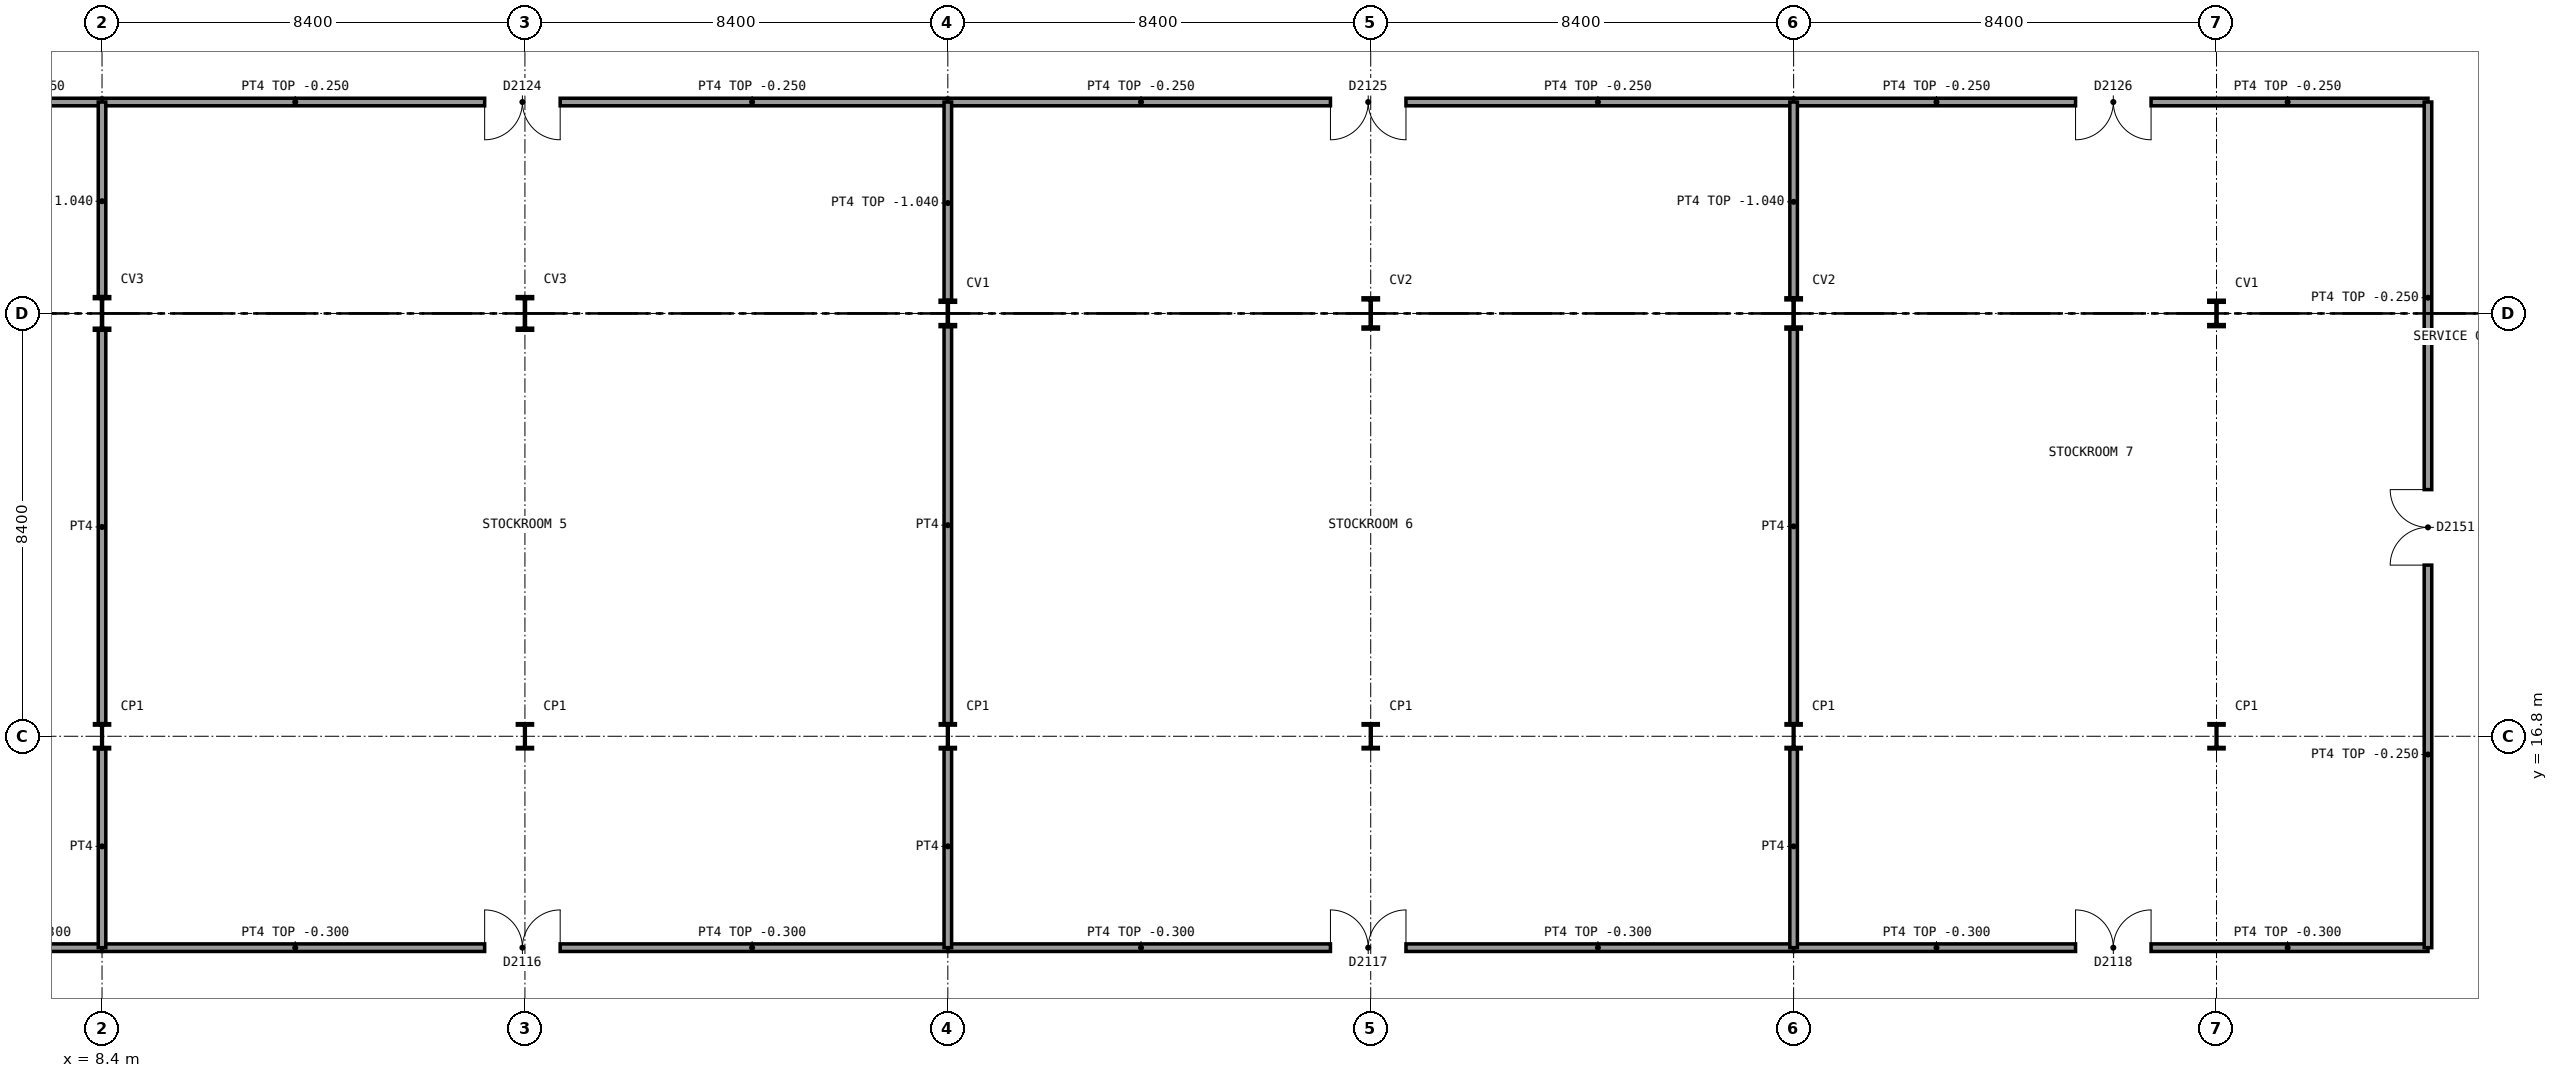
"""IFC4 building model, lengths in metres.
Left out: names, types, materials, properties, quantities, classifications, styles, units other than length and angle.
Written with IfcOpenShell. Run it as: python <this file> out.ifc"""

import sys

from ifc_helpers import new_model, si_unit, direction, frame, frame_2d, origin, origin_2d, place, context, subcontext, project, spatial, rectangle, i_section, extrude, element, fill, save


model = new_model("IFC4")
c1 = context("Model", 3, precision=1e-05, world=origin(), true_north=direction((0.0, 1.0)))
c2 = subcontext(c1, "Body", "Model", "MODEL_VIEW")
j1 = project(units=[si_unit("LENGTHUNIT", "METRE"), si_unit("PLANEANGLEUNIT", "RADIAN")], contexts=[c1])
p1 = place(None, origin())
s1 = spatial("IfcSite", under=j1, at=p1, CompositionType="ELEMENT")
p2 = place(p1, origin())
s2 = spatial("IfcBuilding", under=s1, at=p2, CompositionType="ELEMENT")
p3 = place(p2, frame((0.0, 0.0, -4.9)))
s3 = spatial("IfcBuildingStorey", under=s2, at=p3, CompositionType="ELEMENT", Elevation=-4.9)
p4 = place(p3, frame((8.4, 16.8, 0.0), z_axis=(0.0, 0.0, 1.0), x_axis=(1.0, 0.0, 0.0)))
e1 = element("IfcColumn", 1, at=p4, inside=s3, PredefinedType="COLUMN", context=c2, shape_type="SweptSolid", body=[
    extrude(i_section(OverallWidth=0.3, OverallDepth=0.5, WebThickness=0.014, FlangeThickness=0.028, FilletRadius=0.027, at=origin_2d()), origin(), (0.0, 0.0, 1.0), 4.9),
])
p5 = place(p3, frame((8.4, 25.2, 0.0), z_axis=(0.0, 0.0, 1.0), x_axis=(1.0, 0.0, 0.0)))
e2 = element("IfcColumn", 2, at=p5, inside=s3, PredefinedType="COLUMN", context=c2, shape_type="SweptSolid", body=[
    extrude(i_section(OverallWidth=0.305, OverallDepth=0.668, WebThickness=0.021, FlangeThickness=0.04, FilletRadius=0.027, at=origin_2d()), origin(), (0.0, 0.0, 1.0), 4.9),
])
p6 = place(p3, frame((16.8, 16.8, 0.0), z_axis=(0.0, 0.0, 1.0), x_axis=(1.0, 0.0, 0.0)))
e3 = element("IfcColumn", 3, at=p6, inside=s3, PredefinedType="COLUMN", context=c2, shape_type="SweptSolid", body=[
    extrude(i_section(OverallWidth=0.3, OverallDepth=0.5, WebThickness=0.014, FlangeThickness=0.028, FilletRadius=0.027, at=origin_2d()), origin(), (0.0, 0.0, 1.0), 4.9),
])
p7 = place(p3, frame((16.8, 25.2, 0.0), z_axis=(0.0, 0.0, 1.0), x_axis=(1.0, 0.0, 0.0)))
e4 = element("IfcColumn", 4, at=p7, inside=s3, PredefinedType="COLUMN", context=c2, shape_type="SweptSolid", body=[
    extrude(i_section(OverallWidth=0.305, OverallDepth=0.668, WebThickness=0.021, FlangeThickness=0.04, FilletRadius=0.027, at=origin_2d()), origin(), (0.0, 0.0, 1.0), 4.9),
])
p8 = place(p3, frame((25.2, 16.8, 0.0), z_axis=(0.0, 0.0, 1.0), x_axis=(1.0, 0.0, 0.0)))
e5 = element("IfcColumn", 5, at=p8, inside=s3, PredefinedType="COLUMN", context=c2, shape_type="SweptSolid", body=[
    extrude(i_section(OverallWidth=0.3, OverallDepth=0.5, WebThickness=0.014, FlangeThickness=0.028, FilletRadius=0.027, at=origin_2d()), origin(), (0.0, 0.0, 1.0), 4.9),
])
p9 = place(p3, frame((25.2, 25.2, 0.0), z_axis=(0.0, 0.0, 1.0), x_axis=(1.0, 0.0, 0.0)))
e6 = element("IfcColumn", 6, at=p9, inside=s3, PredefinedType="COLUMN", context=c2, shape_type="SweptSolid", body=[
    extrude(i_section(OverallWidth=0.306, OverallDepth=0.524, WebThickness=0.021, FlangeThickness=0.04, FilletRadius=0.027, at=origin_2d()), origin(), (0.0, 0.0, 1.0), 4.9),
])
p10 = place(p3, frame((33.6, 16.8, 0.0), z_axis=(0.0, 0.0, 1.0), x_axis=(1.0, 0.0, 0.0)))
e7 = element("IfcColumn", 7, at=p10, inside=s3, PredefinedType="COLUMN", context=c2, shape_type="SweptSolid", body=[
    extrude(i_section(OverallWidth=0.3, OverallDepth=0.5, WebThickness=0.014, FlangeThickness=0.028, FilletRadius=0.027, at=origin_2d()), origin(), (0.0, 0.0, 1.0), 4.9),
])
p11 = place(p3, frame((33.6, 25.2, 0.0), z_axis=(0.0, 0.0, 1.0), x_axis=(1.0, 0.0, 0.0)))
e8 = element("IfcColumn", 8, at=p11, inside=s3, PredefinedType="COLUMN", context=c2, shape_type="SweptSolid", body=[
    extrude(i_section(OverallWidth=0.305, OverallDepth=0.62, WebThickness=0.021, FlangeThickness=0.04, FilletRadius=0.027, at=origin_2d()), origin(), (0.0, 0.0, 1.0), 4.9),
])
p12 = place(p3, frame((42.0, 16.8, 0.0), z_axis=(0.0, 0.0, 1.0), x_axis=(1.0, 0.0, 0.0)))
e9 = element("IfcColumn", 9, at=p12, inside=s3, PredefinedType="COLUMN", context=c2, shape_type="SweptSolid", body=[
    extrude(i_section(OverallWidth=0.3, OverallDepth=0.5, WebThickness=0.014, FlangeThickness=0.028, FilletRadius=0.027, at=origin_2d()), origin(), (0.0, 0.0, 1.0), 4.9),
])
p13 = place(p3, frame((42.0, 25.2, 0.0), z_axis=(0.0, 0.0, 1.0), x_axis=(1.0, 0.0, 0.0)))
e10 = element("IfcColumn", 10, at=p13, inside=s3, PredefinedType="COLUMN", context=c2, shape_type="SweptSolid", body=[
    extrude(i_section(OverallWidth=0.305, OverallDepth=0.62, WebThickness=0.021, FlangeThickness=0.04, FilletRadius=0.027, at=origin_2d()), origin(), (0.0, 0.0, 1.0), 4.9),
])
p14 = place(p3, frame((50.4, 16.8, 0.0), z_axis=(0.0, 0.0, 1.0), x_axis=(1.0, 0.0, 0.0)))
e11 = element("IfcColumn", 11, at=p14, inside=s3, PredefinedType="COLUMN", context=c2, shape_type="SweptSolid", body=[
    extrude(i_section(OverallWidth=0.3, OverallDepth=0.5, WebThickness=0.014, FlangeThickness=0.028, FilletRadius=0.027, at=origin_2d()), origin(), (0.0, 0.0, 1.0), 4.9),
])
p15 = place(p3, frame((50.4, 25.2, 0.0), z_axis=(0.0, 0.0, 1.0), x_axis=(1.0, 0.0, 0.0)))
e12 = element("IfcColumn", 12, at=p15, inside=s3, PredefinedType="COLUMN", context=c2, shape_type="SweptSolid", body=[
    extrude(i_section(OverallWidth=0.306, OverallDepth=0.524, WebThickness=0.021, FlangeThickness=0.04, FilletRadius=0.027, at=origin_2d()), origin(), (0.0, 0.0, 1.0), 4.9),
])
p16 = place(p3, frame((0.25, 12.6, 0.0), z_axis=(0.0, 0.0, 1.0), x_axis=(1.0, 0.0, 0.0)))
e13 = element("IfcWall", 13, at=p16, inside=s3, PredefinedType="SOLIDWALL", context=c2, shape_type="SweptSolid", body=[
    extrude(rectangle(XDim=8.15, YDim=0.15, at=frame_2d((4.075, 0.0))), origin(), (0.0, 0.0, 1.0), 4.6),
])
p17 = place(p16, frame((3.35, 0.0, 0.0)))
e14 = element("IfcOpeningElement", 14, at=p17, cuts=e13, PredefinedType="OPENING", context=c2, shape_type="SweptSolid", body=[
    extrude(rectangle(XDim=1.5, YDim=2.1, at=frame_2d((0.75, 1.05))), frame((0.0, 0.085, 0.0), z_axis=(0.0, -1.0, 0.0), x_axis=(1.0, 0.0, 0.0)), (0.0, 0.0, 1.0), 0.17),
])
p18 = place(p3, frame((8.4, 12.6, 0.0), z_axis=(0.0, 0.0, 1.0), x_axis=(1.0, 0.0, 0.0)))
e15 = element("IfcWall", 15, at=p18, inside=s3, PredefinedType="SOLIDWALL", context=c2, shape_type="SweptSolid", body=[
    extrude(rectangle(XDim=16.8, YDim=0.15, at=frame_2d((8.4, 0.0))), origin(), (0.0, 0.0, 1.0), 4.6),
])
p19 = place(p18, frame((7.6, 0.0, 0.0)))
e16 = element("IfcOpeningElement", 16, at=p19, cuts=e15, PredefinedType="OPENING", context=c2, shape_type="SweptSolid", body=[
    extrude(rectangle(XDim=1.5, YDim=2.1, at=frame_2d((0.75, 1.05))), frame((0.0, 0.085, 0.0), z_axis=(0.0, -1.0, 0.0), x_axis=(1.0, 0.0, 0.0)), (0.0, 0.0, 1.0), 0.17),
])
p20 = place(p3, frame((25.2, 12.6, 0.0), z_axis=(0.0, 0.0, 1.0), x_axis=(1.0, 0.0, 0.0)))
e17 = element("IfcWall", 17, at=p20, inside=s3, PredefinedType="SOLIDWALL", context=c2, shape_type="SweptSolid", body=[
    extrude(rectangle(XDim=16.8, YDim=0.15, at=frame_2d((8.4, 0.0))), origin(), (0.0, 0.0, 1.0), 4.6),
])
p21 = place(p20, frame((7.6, 0.0, 0.0)))
e18 = element("IfcOpeningElement", 18, at=p21, cuts=e17, PredefinedType="OPENING", context=c2, shape_type="SweptSolid", body=[
    extrude(rectangle(XDim=1.5, YDim=2.1, at=frame_2d((0.75, 1.05))), frame((0.0, 0.085, 0.0), z_axis=(0.0, -1.0, 0.0), x_axis=(1.0, 0.0, 0.0)), (0.0, 0.0, 1.0), 0.17),
])
p22 = place(p3, frame((42.0, 12.6, 0.0), z_axis=(0.0, 0.0, 1.0), x_axis=(1.0, 0.0, 0.0)))
e19 = element("IfcWall", 19, at=p22, inside=s3, PredefinedType="SOLIDWALL", context=c2, shape_type="SweptSolid", body=[
    extrude(rectangle(XDim=12.6, YDim=0.15, at=frame_2d((6.3, 0.0))), origin(), (0.0, 0.0, 1.0), 4.6),
])
p23 = place(p22, frame((5.6, 0.0, 0.0)))
e20 = element("IfcOpeningElement", 20, at=p23, cuts=e19, PredefinedType="OPENING", context=c2, shape_type="SweptSolid", body=[
    extrude(rectangle(XDim=1.5, YDim=2.1, at=frame_2d((0.75, 1.05))), frame((0.0, 0.085, 0.0), z_axis=(0.0, -1.0, 0.0), x_axis=(1.0, 0.0, 0.0)), (0.0, 0.0, 1.0), 0.17),
])
p24 = place(p3, frame((0.0, 29.4, 0.0), z_axis=(0.0, 0.0, 1.0), x_axis=(1.0, 0.0, 0.0)))
e21 = element("IfcWall", 21, at=p24, inside=s3, PredefinedType="SOLIDWALL", context=c2, shape_type="SweptSolid", body=[
    extrude(rectangle(XDim=8.4, YDim=0.15, at=frame_2d((4.2, 0.0))), origin(), (0.0, 0.0, 1.0), 4.65),
])
p25 = place(p24, frame((3.35, 0.0, 0.0)))
e22 = element("IfcOpeningElement", 22, at=p25, cuts=e21, PredefinedType="OPENING", context=c2, shape_type="SweptSolid", body=[
    extrude(rectangle(XDim=1.5, YDim=2.1, at=frame_2d((0.75, 1.05))), frame((0.0, 0.085, 0.0), z_axis=(0.0, -1.0, 0.0), x_axis=(1.0, 0.0, 0.0)), (0.0, 0.0, 1.0), 0.17),
])
p26 = place(p3, frame((8.4, 29.4, 0.0), z_axis=(0.0, 0.0, 1.0), x_axis=(1.0, 0.0, 0.0)))
e23 = element("IfcWall", 23, at=p26, inside=s3, PredefinedType="SOLIDWALL", context=c2, shape_type="SweptSolid", body=[
    extrude(rectangle(XDim=16.8, YDim=0.15, at=frame_2d((8.4, 0.0))), origin(), (0.0, 0.0, 1.0), 4.65),
])
p27 = place(p26, frame((7.6, 0.0, 0.0)))
e24 = element("IfcOpeningElement", 24, at=p27, cuts=e23, PredefinedType="OPENING", context=c2, shape_type="SweptSolid", body=[
    extrude(rectangle(XDim=1.5, YDim=2.1, at=frame_2d((0.75, 1.05))), frame((0.0, 0.085, 0.0), z_axis=(0.0, -1.0, 0.0), x_axis=(1.0, 0.0, 0.0)), (0.0, 0.0, 1.0), 0.17),
])
p28 = place(p3, frame((25.2, 29.4, 0.0), z_axis=(0.0, 0.0, 1.0), x_axis=(1.0, 0.0, 0.0)))
e25 = element("IfcWall", 25, at=p28, inside=s3, PredefinedType="SOLIDWALL", context=c2, shape_type="SweptSolid", body=[
    extrude(rectangle(XDim=16.8, YDim=0.15, at=frame_2d((8.4, 0.0))), origin(), (0.0, 0.0, 1.0), 4.65),
])
p29 = place(p28, frame((7.6, 0.0, 0.0)))
e26 = element("IfcOpeningElement", 26, at=p29, cuts=e25, PredefinedType="OPENING", context=c2, shape_type="SweptSolid", body=[
    extrude(rectangle(XDim=1.5, YDim=2.1, at=frame_2d((0.75, 1.05))), frame((0.0, 0.085, 0.0), z_axis=(0.0, -1.0, 0.0), x_axis=(1.0, 0.0, 0.0)), (0.0, 0.0, 1.0), 0.17),
])
p30 = place(p3, frame((42.0, 29.4, 0.0), z_axis=(0.0, 0.0, 1.0), x_axis=(1.0, 0.0, 0.0)))
e27 = element("IfcWall", 27, at=p30, inside=s3, PredefinedType="SOLIDWALL", context=c2, shape_type="SweptSolid", body=[
    extrude(rectangle(XDim=12.6, YDim=0.15, at=frame_2d((6.3, 0.0))), origin(), (0.0, 0.0, 1.0), 4.65),
])
p31 = place(p30, frame((5.6, 0.0, 0.0)))
e28 = element("IfcOpeningElement", 28, at=p31, cuts=e27, PredefinedType="OPENING", context=c2, shape_type="SweptSolid", body=[
    extrude(rectangle(XDim=1.5, YDim=2.1, at=frame_2d((0.75, 1.05))), frame((0.0, 0.085, 0.0), z_axis=(0.0, -1.0, 0.0), x_axis=(1.0, 0.0, 0.0)), (0.0, 0.0, 1.0), 0.17),
])
p32 = place(p3, frame((54.6, 12.6, 0.0), z_axis=(0.0, 0.0, 1.0), x_axis=(0.0, 1.0, 0.0)))
e29 = element("IfcWall", 29, at=p32, inside=s3, PredefinedType="SOLIDWALL", context=c2, shape_type="SweptSolid", body=[
    extrude(rectangle(XDim=16.8, YDim=0.15, at=frame_2d((8.4, 0.0))), origin(), (0.0, 0.0, 1.0), 4.65),
])
p33 = place(p32, frame((7.6, 0.0, 0.0)))
e30 = element("IfcOpeningElement", 30, at=p33, cuts=e29, PredefinedType="OPENING", context=c2, shape_type="SweptSolid", body=[
    extrude(rectangle(XDim=1.5, YDim=2.1, at=frame_2d((0.75, 1.05))), frame((0.0, 0.085, 0.0), z_axis=(0.0, -1.0, 0.0), x_axis=(1.0, 0.0, 0.0)), (0.0, 0.0, 1.0), 0.17),
])
p34 = place(p3, frame((8.4, 12.6, 0.0), z_axis=(0.0, 0.0, 1.0), x_axis=(0.0, 1.0, 0.0)))
e31 = element("IfcWall", 31, at=p34, inside=s3, PredefinedType="SOLIDWALL", context=c2, shape_type="SweptSolid", body=[
    extrude(rectangle(XDim=3.95, YDim=0.15, at=frame_2d((1.975, 0.0))), origin(), (0.0, 0.0, 1.0), 4.26),
])
p35 = place(p3, frame((8.4, 17.05, 0.0), z_axis=(0.0, 0.0, 1.0), x_axis=(0.0, 1.0, 0.0)))
e32 = element("IfcWall", 32, at=p35, inside=s3, PredefinedType="SOLIDWALL", context=c2, shape_type="SweptSolid", body=[
    extrude(rectangle(XDim=7.816, YDim=0.15, at=frame_2d((3.908, 0.0))), origin(), (0.0, 0.0, 1.0), 4.26),
])
p36 = place(p3, frame((8.4, 25.534, 0.0), z_axis=(0.0, 0.0, 1.0), x_axis=(0.0, 1.0, 0.0)))
e33 = element("IfcWall", 33, at=p36, inside=s3, PredefinedType="SOLIDWALL", context=c2, shape_type="SweptSolid", body=[
    extrude(rectangle(XDim=3.866, YDim=0.15, at=frame_2d((1.933, 0.0))), origin(), (0.0, 0.0, 1.0), 3.86),
])
p37 = place(p3, frame((25.2, 12.6, 0.0), z_axis=(0.0, 0.0, 1.0), x_axis=(0.0, 1.0, 0.0)))
e34 = element("IfcWall", 34, at=p37, inside=s3, PredefinedType="SOLIDWALL", context=c2, shape_type="SweptSolid", body=[
    extrude(rectangle(XDim=3.95, YDim=0.15, at=frame_2d((1.975, 0.0))), origin(), (0.0, 0.0, 1.0), 4.26),
])
p38 = place(p3, frame((25.2, 17.05, 0.0), z_axis=(0.0, 0.0, 1.0), x_axis=(0.0, 1.0, 0.0)))
e35 = element("IfcWall", 35, at=p38, inside=s3, PredefinedType="SOLIDWALL", context=c2, shape_type="SweptSolid", body=[
    extrude(rectangle(XDim=7.888, YDim=0.15, at=frame_2d((3.944, 0.0))), origin(), (0.0, 0.0, 1.0), 4.26),
])
p39 = place(p3, frame((25.2, 25.462, 0.0), z_axis=(0.0, 0.0, 1.0), x_axis=(0.0, 1.0, 0.0)))
e36 = element("IfcWall", 36, at=p39, inside=s3, PredefinedType="SOLIDWALL", context=c2, shape_type="SweptSolid", body=[
    extrude(rectangle(XDim=3.938, YDim=0.15, at=frame_2d((1.969, 0.0))), origin(), (0.0, 0.0, 1.0), 3.86),
])
p40 = place(p3, frame((42.0, 12.6, 0.0), z_axis=(0.0, 0.0, 1.0), x_axis=(0.0, 1.0, 0.0)))
e37 = element("IfcWall", 37, at=p40, inside=s3, PredefinedType="SOLIDWALL", context=c2, shape_type="SweptSolid", body=[
    extrude(rectangle(XDim=3.95, YDim=0.15, at=frame_2d((1.975, 0.0))), origin(), (0.0, 0.0, 1.0), 4.26),
])
p41 = place(p3, frame((42.0, 17.05, 0.0), z_axis=(0.0, 0.0, 1.0), x_axis=(0.0, 1.0, 0.0)))
e38 = element("IfcWall", 38, at=p41, inside=s3, PredefinedType="SOLIDWALL", context=c2, shape_type="SweptSolid", body=[
    extrude(rectangle(XDim=7.84, YDim=0.15, at=frame_2d((3.92, 0.0))), origin(), (0.0, 0.0, 1.0), 4.26),
])
p42 = place(p3, frame((42.0, 25.51, 0.0), z_axis=(0.0, 0.0, 1.0), x_axis=(0.0, 1.0, 0.0)))
e39 = element("IfcWall", 39, at=p42, inside=s3, PredefinedType="SOLIDWALL", context=c2, shape_type="SweptSolid", body=[
    extrude(rectangle(XDim=3.89, YDim=0.15, at=frame_2d((1.945, 0.0))), origin(), (0.0, 0.0, 1.0), 3.86),
])
p43 = place(p19, origin())
e40 = element("IfcDoor", 40, at=p43, inside=s3, OperationType="DOUBLE_DOOR_SINGLE_SWING", PredefinedType="DOOR", context=c2, shape_type="SweptSolid", body=[
    extrude(rectangle(XDim=1.5, YDim=2.1, at=frame_2d((0.75, 1.05))), frame((0.0, 0.025, 0.0), z_axis=(0.0, -1.0, 0.0), x_axis=(1.0, 0.0, 0.0)), (0.0, 0.0, 1.0), 0.05),
])
fill(e16, e40)
p44 = place(p21, origin())
e41 = element("IfcDoor", 41, at=p44, inside=s3, OperationType="DOUBLE_DOOR_SINGLE_SWING", PredefinedType="DOOR", context=c2, shape_type="SweptSolid", body=[
    extrude(rectangle(XDim=1.5, YDim=2.1, at=frame_2d((0.75, 1.05))), frame((0.0, 0.025, 0.0), z_axis=(0.0, -1.0, 0.0), x_axis=(1.0, 0.0, 0.0)), (0.0, 0.0, 1.0), 0.05),
])
fill(e18, e41)
p45 = place(p23, origin())
e42 = element("IfcDoor", 42, at=p45, inside=s3, OperationType="DOUBLE_DOOR_SINGLE_SWING", PredefinedType="DOOR", context=c2, shape_type="SweptSolid", body=[
    extrude(rectangle(XDim=1.5, YDim=2.1, at=frame_2d((0.75, 1.05))), frame((0.0, 0.025, 0.0), z_axis=(0.0, -1.0, 0.0), x_axis=(1.0, 0.0, 0.0)), (0.0, 0.0, 1.0), 0.05),
])
fill(e20, e42)
p46 = place(p27, frame((1.5, 0.0, 0.0), z_axis=(0.0, 0.0, 1.0), x_axis=(-1.0, 0.0, 0.0)))
e43 = element("IfcDoor", 43, at=p46, inside=s3, OperationType="DOUBLE_DOOR_SINGLE_SWING", PredefinedType="DOOR", context=c2, shape_type="SweptSolid", body=[
    extrude(rectangle(XDim=1.5, YDim=2.1, at=frame_2d((0.75, 1.05))), frame((0.0, 0.025, 0.0), z_axis=(0.0, -1.0, 0.0), x_axis=(1.0, 0.0, 0.0)), (0.0, 0.0, 1.0), 0.05),
])
fill(e24, e43)
p47 = place(p29, frame((1.5, 0.0, 0.0), z_axis=(0.0, 0.0, 1.0), x_axis=(-1.0, 0.0, 0.0)))
e44 = element("IfcDoor", 44, at=p47, inside=s3, OperationType="DOUBLE_DOOR_SINGLE_SWING", PredefinedType="DOOR", context=c2, shape_type="SweptSolid", body=[
    extrude(rectangle(XDim=1.5, YDim=2.1, at=frame_2d((0.75, 1.05))), frame((0.0, 0.025, 0.0), z_axis=(0.0, -1.0, 0.0), x_axis=(1.0, 0.0, 0.0)), (0.0, 0.0, 1.0), 0.05),
])
fill(e26, e44)
p48 = place(p31, frame((1.5, 0.0, 0.0), z_axis=(0.0, 0.0, 1.0), x_axis=(-1.0, 0.0, 0.0)))
e45 = element("IfcDoor", 45, at=p48, inside=s3, OperationType="DOUBLE_DOOR_SINGLE_SWING", PredefinedType="DOOR", context=c2, shape_type="SweptSolid", body=[
    extrude(rectangle(XDim=1.5, YDim=2.1, at=frame_2d((0.75, 1.05))), frame((0.0, 0.025, 0.0), z_axis=(0.0, -1.0, 0.0), x_axis=(1.0, 0.0, 0.0)), (0.0, 0.0, 1.0), 0.05),
])
fill(e28, e45)
p49 = place(p33, origin())
e46 = element("IfcDoor", 46, at=p49, inside=s3, OperationType="DOUBLE_DOOR_SINGLE_SWING", PredefinedType="DOOR", context=c2, shape_type="SweptSolid", body=[
    extrude(rectangle(XDim=1.5, YDim=2.1, at=frame_2d((0.75, 1.05))), frame((0.0, 0.025, 0.0), z_axis=(0.0, -1.0, 0.0), x_axis=(1.0, 0.0, 0.0)), (0.0, 0.0, 1.0), 0.05),
])
fill(e30, e46)
save(model, sys.argv[1])
